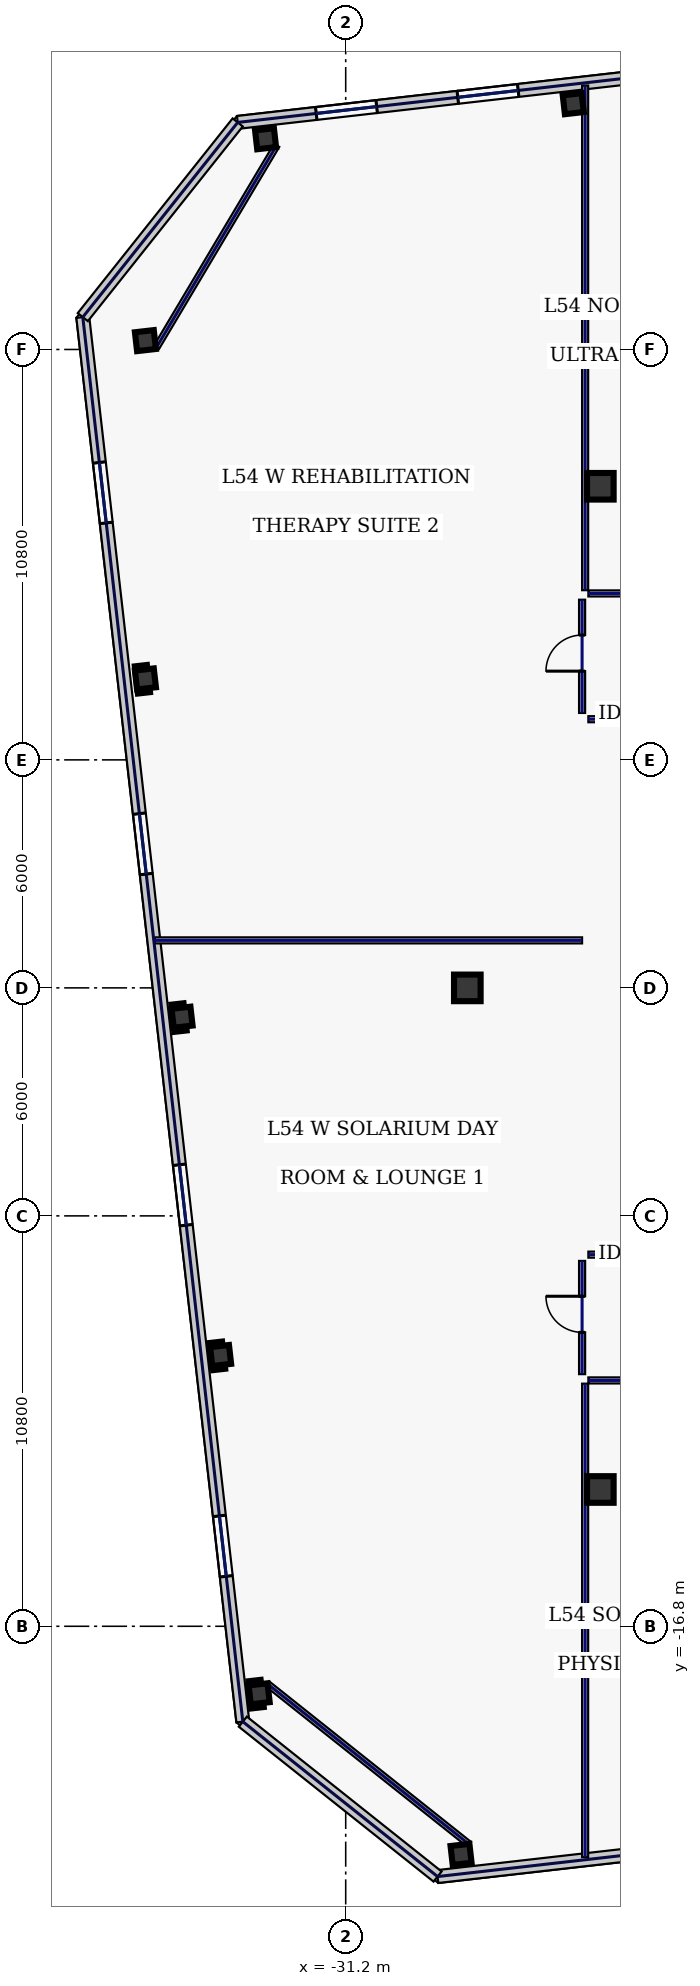
"""IFC4 building model, lengths in metres.
Left out: names, types, materials, properties, quantities, classifications, styles, units other than length and angle.
Written with IfcOpenShell. Run it as: python <this file> out.ifc"""

import sys

from ifc_helpers import new_model, si_unit, direction, frame, frame_2d, origin, origin_2d, place, context, subcontext, project, spatial, rectangle, hollow_rectangle, extrude, element, fill, save


model = new_model("IFC4")
c1 = context("Model", 3, precision=1e-05, world=origin(), true_north=direction((0.0, 1.0)))
c2 = subcontext(c1, "Body", "Model", "MODEL_VIEW")
j1 = project(units=[si_unit("LENGTHUNIT", "METRE"), si_unit("PLANEANGLEUNIT", "RADIAN")], contexts=[c1])
p1 = place(None, origin())
s1 = spatial("IfcSite", under=j1, at=p1, CompositionType="ELEMENT")
p2 = place(p1, origin())
s2 = spatial("IfcBuilding", under=s1, at=p2, CompositionType="ELEMENT")
p3 = place(p2, frame((0.0, 0.0, 234.2)))
s3 = spatial("IfcBuildingStorey", under=s2, at=p3, CompositionType="ELEMENT", Elevation=234.2)
for number, where, z_axis, x_axis in (
    (1, (-24.5, -13.2, 0.0), (0.0, 0.0, 1.0), (1.0, 0.0, 0.0)),
    (2, (-24.5, 13.2, 0.0), (0.0, 0.0, 1.0), (1.0, 0.0, 0.0)),
    (3, (-28.0, 0.0, 0.0), (0.0, 0.0, 1.0), (1.0, 0.0, 0.0)),
):
    element("IfcColumn", number, at=place(p3, frame(where, z_axis=z_axis, x_axis=x_axis)), inside=s3, PredefinedType="COLUMN", context=c2, shape_type="SweptSolid", body=[
        extrude(hollow_rectangle(XDim=0.7, YDim=0.7, WallThickness=0.032, at=origin_2d()), origin(), (0.0, 0.0, 1.0), 3.74),
    ])
for number, where, z_axis, x_axis in (
    (4, (-28.165, -22.802, 0.0), (0.0, 0.0, 1.0), (0.994, 0.113, 0.0)),
    (5, (-25.212, 23.268, 0.0), (0.0, 0.0, 1.0), (0.994, 0.113, 0.0)),
    (6, (-33.309, 22.345, 0.0), (0.0, 0.0, 1.0), (0.994, 0.113, 0.0)),
    (7, (-36.47, 17.033, 0.0), (0.0, 0.0, 1.0), (0.994, 0.113, 0.0)),
    (8, (-36.47, 8.131, 0.0), (0.0, 0.0, 1.0), (0.994, 0.113, 0.0)),
    (9, (-35.506, -0.772, 0.0), (0.0, 0.0, 1.0), (0.994, 0.113, 0.0)),
    (10, (-34.491, -9.674, 0.0), (0.0, 0.0, 1.0), (0.994, 0.113, 0.0)),
    (11, (-33.477, -18.577, 0.0), (0.0, 0.0, 1.0), (0.994, 0.113, 0.0)),
):
    element("IfcColumn", number, at=place(p3, frame(where, z_axis=z_axis, x_axis=x_axis)), inside=s3, PredefinedType="COLUMN", context=c2, shape_type="SweptSolid", body=[
        extrude(hollow_rectangle(XDim=0.5, YDim=0.5, WallThickness=0.025, at=origin_2d()), origin(), (0.0, 0.0, 1.0), 3.74),
    ])
p4 = place(p3, frame((-28.783, -23.386, 0.0), z_axis=(0.0, 0.0, 1.0), x_axis=(0.993572271362, 0.113199565282, 0.0)))
e12 = element("IfcWall", 12, at=p4, inside=s3, PredefinedType="STANDARD", context=c2, shape_type="SweptSolid", body=[
    extrude(rectangle(XDim=18.651, YDim=0.34, at=frame_2d((9.326, 0.0))), origin(), (0.0, 0.0, 1.0), 3.74),
])
p5 = place(p4, frame((5.829, 0.0, 0.22)))
e13 = element("IfcOpeningElement", 13, at=p5, cuts=e12, PredefinedType="OPENING", context=c2, shape_type="SweptSolid", body=[
    extrude(rectangle(XDim=1.6, YDim=1.2, at=frame_2d((0.8, 0.6))), frame((0.0, 0.18, 0.0), z_axis=(0.0, -1.0, 0.0), x_axis=(1.0, 0.0, 0.0)), (0.0, 0.0, 1.0), 0.36),
])
p6 = place(p4, frame((10.229, 0.0, 0.22)))
e14 = element("IfcOpeningElement", 14, at=p6, cuts=e12, PredefinedType="OPENING", context=c2, shape_type="SweptSolid", body=[
    extrude(rectangle(XDim=1.6, YDim=1.2, at=frame_2d((0.8, 0.6))), frame((0.0, 0.18, 0.0), z_axis=(0.0, -1.0, 0.0), x_axis=(1.0, 0.0, 0.0)), (0.0, 0.0, 1.0), 0.36),
])
p7 = place(p3, frame((-15.51, 24.886, 0.0), z_axis=(0.0, 0.0, 1.0), x_axis=(-0.993572271362, -0.113199565282, 0.0)))
e15 = element("IfcWall", 15, at=p7, inside=s3, PredefinedType="STANDARD", context=c2, shape_type="SweptSolid", body=[
    extrude(rectangle(XDim=18.651, YDim=0.34, at=frame_2d((9.326, 0.0))), origin(), (0.0, 0.0, 1.0), 3.74),
])
p8 = place(p7, frame((14.971, 0.0, 0.22)))
e16 = element("IfcOpeningElement", 16, at=p8, cuts=e15, PredefinedType="OPENING", context=c2, shape_type="SweptSolid", body=[
    extrude(rectangle(XDim=1.6, YDim=1.2, at=frame_2d((0.8, 0.6))), frame((0.0, 0.18, 0.0), z_axis=(0.0, -1.0, 0.0), x_axis=(1.0, 0.0, 0.0)), (0.0, 0.0, 1.0), 0.36),
])
p9 = place(p7, frame((11.223, 0.0, 0.22)))
e17 = element("IfcOpeningElement", 17, at=p9, cuts=e15, PredefinedType="OPENING", context=c2, shape_type="SweptSolid", body=[
    extrude(rectangle(XDim=1.6, YDim=1.2, at=frame_2d((0.8, 0.6))), frame((0.0, 0.18, 0.0), z_axis=(0.0, -1.0, 0.0), x_axis=(1.0, 0.0, 0.0)), (0.0, 0.0, 1.0), 0.36),
])
p10 = place(p7, frame((6.823, 0.0, 0.22)))
e18 = element("IfcOpeningElement", 18, at=p10, cuts=e15, PredefinedType="OPENING", context=c2, shape_type="SweptSolid", body=[
    extrude(rectangle(XDim=1.6, YDim=1.2, at=frame_2d((0.8, 0.6))), frame((0.0, 0.18, 0.0), z_axis=(0.0, -1.0, 0.0), x_axis=(1.0, 0.0, 0.0)), (0.0, 0.0, 1.0), 0.36),
])
p11 = place(p3, frame((-38.118, 17.651, 0.0), z_axis=(0.0, 0.0, 1.0), x_axis=(0.11320360501, -0.9935718111, 0.0)))
e19 = element("IfcWall", 19, at=p11, inside=s3, PredefinedType="STANDARD", context=c2, shape_type="SweptSolid", body=[
    extrude(rectangle(XDim=37.2, YDim=0.34, at=frame_2d((18.6, 0.0))), origin(), (0.0, 0.0, 1.0), 3.74),
])
p12 = place(p11, frame((3.85, 0.0, 0.22)))
e20 = element("IfcOpeningElement", 20, at=p12, cuts=e19, PredefinedType="OPENING", context=c2, shape_type="SweptSolid", body=[
    extrude(rectangle(XDim=1.6, YDim=1.2, at=frame_2d((0.8, 0.6))), frame((0.0, 0.18, 0.0), z_axis=(0.0, -1.0, 0.0), x_axis=(1.0, 0.0, 0.0)), (0.0, 0.0, 1.0), 0.36),
])
p13 = place(p11, frame((13.15, 0.0, 0.22)))
e21 = element("IfcOpeningElement", 21, at=p13, cuts=e19, PredefinedType="OPENING", context=c2, shape_type="SweptSolid", body=[
    extrude(rectangle(XDim=1.6, YDim=1.2, at=frame_2d((0.8, 0.6))), frame((0.0, 0.18, 0.0), z_axis=(0.0, -1.0, 0.0), x_axis=(1.0, 0.0, 0.0)), (0.0, 0.0, 1.0), 0.36),
])
p14 = place(p11, frame((22.45, 0.0, 0.22)))
e22 = element("IfcOpeningElement", 22, at=p14, cuts=e19, PredefinedType="OPENING", context=c2, shape_type="SweptSolid", body=[
    extrude(rectangle(XDim=1.6, YDim=1.2, at=frame_2d((0.8, 0.6))), frame((0.0, 0.18, 0.0), z_axis=(0.0, -1.0, 0.0), x_axis=(1.0, 0.0, 0.0)), (0.0, 0.0, 1.0), 0.36),
])
p15 = place(p11, frame((31.75, 0.0, 0.22)))
e23 = element("IfcOpeningElement", 23, at=p15, cuts=e19, PredefinedType="OPENING", context=c2, shape_type="SweptSolid", body=[
    extrude(rectangle(XDim=1.6, YDim=1.2, at=frame_2d((0.8, 0.6))), frame((0.0, 0.18, 0.0), z_axis=(0.0, -1.0, 0.0), x_axis=(1.0, 0.0, 0.0)), (0.0, 0.0, 1.0), 0.36),
])
for number, where, z_axis, x_axis in (
    (24, (-34.042, 22.775, 0.0), (0.0, 0.0, 1.0), (-0.623, -0.783, 0.0)),
    (25, (-33.907, -19.31, 0.0), (0.0, 0.0, 1.0), (0.783, -0.623, 0.0)),
):
    element("IfcWall", number, at=place(p3, frame(where, z_axis=z_axis, x_axis=x_axis)), inside=s3, PredefinedType="STANDARD", context=c2, shape_type="SweptSolid", body=[
        extrude(rectangle(XDim=6.548, YDim=0.34, at=frame_2d((3.274, 0.0))), origin(), (0.0, 0.0, 1.0), 3.74),
    ])
p16 = place(p3, frame((-33.016, 22.171, 0.0), z_axis=(0.0, 0.0, 1.0), x_axis=(-0.511385266265, -0.859351563359, 0.0)))
e26 = element("IfcWall", 26, at=p16, inside=s3, PredefinedType="PARTITIONING", context=c2, shape_type="SweptSolid", body=[
    extrude(rectangle(XDim=6.182, YDim=0.16, at=frame_2d((3.091, 0.0))), origin(), (0.0, 0.0, 1.0), 1.535),
])
p17 = place(p3, frame((-33.265, -18.311, 0.0), z_axis=(0.0, 0.0, 1.0), x_axis=(0.782602647064, -0.622521563328, 0.0)))
e27 = element("IfcWall", 27, at=p17, inside=s3, PredefinedType="PARTITIONING", context=c2, shape_type="SweptSolid", body=[
    extrude(rectangle(XDim=6.788, YDim=0.16, at=frame_2d((3.394, 0.0))), origin(), (0.0, 0.0, 1.0), 1.535),
])
p18 = place(p3, frame((-24.98, -10.165, 0.0), z_axis=(0.0, 0.0, 1.0), x_axis=(0.0, 1.0, 0.0)))
e28 = element("IfcWall", 28, at=p18, inside=s3, PredefinedType="PARTITIONING", context=c2, shape_type="SweptSolid", body=[
    extrude(rectangle(XDim=2.98, YDim=0.16, at=frame_2d((1.49, 0.0))), origin(), (0.0, 0.0, 1.0), 3.74),
])
p19 = place(p18, frame((1.1, 0.0, 0.0)))
e29 = element("IfcOpeningElement", 29, at=p19, cuts=e28, PredefinedType="OPENING", context=c2, shape_type="SweptSolid", body=[
    extrude(rectangle(XDim=0.95, YDim=2.2, at=frame_2d((0.475, 1.1))), frame((0.0, 0.09, 0.0), z_axis=(0.0, -1.0, 0.0), x_axis=(1.0, 0.0, 0.0)), (0.0, 0.0, 1.0), 0.18),
])
for number, where, z_axis, x_axis in (
    (30, (-24.815, -7.02, 0.0), (0.0, 0.0, 1.0), (1.0, 0.0, 0.0)),
    (31, (-10.715, 7.07, 0.0), (0.0, 0.0, 1.0), (-1.0, 0.0, 0.0)),
):
    element("IfcWall", number, at=place(p3, frame(where, z_axis=z_axis, x_axis=x_axis)), inside=s3, PredefinedType="PARTITIONING", context=c2, shape_type="SweptSolid", body=[
        extrude(rectangle(XDim=14.1, YDim=0.16, at=frame_2d((7.05, 0.0))), origin(), (0.0, 0.0, 1.0), 3.74),
    ])
p20 = place(p3, frame((-24.98, 7.235, 0.0), z_axis=(0.0, 0.0, 1.0), x_axis=(0.0, 1.0, 0.0)))
e32 = element("IfcWall", 32, at=p20, inside=s3, PredefinedType="PARTITIONING", context=c2, shape_type="SweptSolid", body=[
    extrude(rectangle(XDim=2.98, YDim=0.16, at=frame_2d((1.49, 0.0))), origin(), (0.0, 0.0, 1.0), 3.74),
])
p21 = place(p20, frame((1.1, 0.0, 0.0)))
e33 = element("IfcOpeningElement", 33, at=p21, cuts=e32, PredefinedType="OPENING", context=c2, shape_type="SweptSolid", body=[
    extrude(rectangle(XDim=0.95, YDim=2.2, at=frame_2d((0.475, 1.1))), frame((0.0, 0.09, 0.0), z_axis=(0.0, -1.0, 0.0), x_axis=(1.0, 0.0, 0.0)), (0.0, 0.0, 1.0), 0.18),
])
p22 = place(p3, frame((-24.815, 10.38, 0.0), z_axis=(0.0, 0.0, 1.0), x_axis=(1.0, 0.0, 0.0)))
e34 = element("IfcWall", 34, at=p22, inside=s3, PredefinedType="PARTITIONING", context=c2, shape_type="SweptSolid", body=[
    extrude(rectangle(XDim=49.63, YDim=0.16, at=frame_2d((24.815, 0.0))), origin(), (0.0, 0.0, 1.0), 3.74),
])
p23 = place(p22, frame((2.044, 0.0, 0.0)))
e35 = element("IfcOpeningElement", 35, at=p23, cuts=e34, PredefinedType="OPENING", context=c2, shape_type="SweptSolid", body=[
    extrude(rectangle(XDim=0.95, YDim=2.2, at=frame_2d((0.475, 1.1))), frame((0.0, 0.09, 0.0), z_axis=(0.0, -1.0, 0.0), x_axis=(1.0, 0.0, 0.0)), (0.0, 0.0, 1.0), 0.18),
])
p24 = place(p22, frame((7.22, 0.0, 0.0)))
e36 = element("IfcOpeningElement", 36, at=p24, cuts=e34, PredefinedType="OPENING", context=c2, shape_type="SweptSolid", body=[
    extrude(rectangle(XDim=1.05, YDim=2.2, at=frame_2d((0.525, 1.1))), frame((0.0, 0.09, 0.0), z_axis=(0.0, -1.0, 0.0), x_axis=(1.0, 0.0, 0.0)), (0.0, 0.0, 1.0), 0.18),
])
p25 = place(p22, frame((13.77, 0.0, 0.0)))
e37 = element("IfcOpeningElement", 37, at=p25, cuts=e34, PredefinedType="OPENING", context=c2, shape_type="SweptSolid", body=[
    extrude(rectangle(XDim=1.3, YDim=2.2, at=frame_2d((0.65, 1.1))), frame((0.0, 0.09, 0.0), z_axis=(0.0, -1.0, 0.0), x_axis=(1.0, 0.0, 0.0)), (0.0, 0.0, 1.0), 0.18),
])
p26 = place(p22, frame((21.925, 0.0, 0.0)))
e38 = element("IfcOpeningElement", 38, at=p26, cuts=e34, PredefinedType="OPENING", context=c2, shape_type="SweptSolid", body=[
    extrude(rectangle(XDim=0.95, YDim=2.2, at=frame_2d((0.475, 1.1))), frame((0.0, 0.09, 0.0), z_axis=(0.0, -1.0, 0.0), x_axis=(1.0, 0.0, 0.0)), (0.0, 0.0, 1.0), 0.18),
])
p27 = place(p22, frame((30.525, 0.0, 0.0)))
e39 = element("IfcOpeningElement", 39, at=p27, cuts=e34, PredefinedType="OPENING", context=c2, shape_type="SweptSolid", body=[
    extrude(rectangle(XDim=0.95, YDim=2.2, at=frame_2d((0.475, 1.1))), frame((0.0, 0.09, 0.0), z_axis=(0.0, -1.0, 0.0), x_axis=(1.0, 0.0, 0.0)), (0.0, 0.0, 1.0), 0.18),
])
p28 = place(p22, frame((38.85, 0.0, 0.0)))
e40 = element("IfcOpeningElement", 40, at=p28, cuts=e34, PredefinedType="OPENING", context=c2, shape_type="SweptSolid", body=[
    extrude(rectangle(XDim=1.3, YDim=2.2, at=frame_2d((0.65, 1.1))), frame((0.0, 0.09, 0.0), z_axis=(0.0, -1.0, 0.0), x_axis=(1.0, 0.0, 0.0)), (0.0, 0.0, 1.0), 0.18),
])
p29 = place(p22, frame((45.906, 0.0, 0.0)))
e41 = element("IfcOpeningElement", 41, at=p29, cuts=e34, PredefinedType="OPENING", context=c2, shape_type="SweptSolid", body=[
    extrude(rectangle(XDim=1.3, YDim=2.2, at=frame_2d((0.65, 1.1))), frame((0.0, 0.09, 0.0), z_axis=(0.0, -1.0, 0.0), x_axis=(1.0, 0.0, 0.0)), (0.0, 0.0, 1.0), 0.18),
])
p30 = place(p3, frame((24.815, -10.33, 0.0), z_axis=(0.0, 0.0, 1.0), x_axis=(-1.0, 0.0, 0.0)))
e42 = element("IfcWall", 42, at=p30, inside=s3, PredefinedType="PARTITIONING", context=c2, shape_type="SweptSolid", body=[
    extrude(rectangle(XDim=49.63, YDim=0.16, at=frame_2d((24.815, 0.0))), origin(), (0.0, 0.0, 1.0), 3.74),
])
p31 = place(p30, frame((46.806, 0.0, 0.0)))
e43 = element("IfcOpeningElement", 43, at=p31, cuts=e42, PredefinedType="OPENING", context=c2, shape_type="SweptSolid", body=[
    extrude(rectangle(XDim=0.95, YDim=2.2, at=frame_2d((0.475, 1.1))), frame((0.0, 0.09, 0.0), z_axis=(0.0, -1.0, 0.0), x_axis=(1.0, 0.0, 0.0)), (0.0, 0.0, 1.0), 0.18),
])
p32 = place(p30, frame((41.955, 0.0, 0.0)))
e44 = element("IfcOpeningElement", 44, at=p32, cuts=e42, PredefinedType="OPENING", context=c2, shape_type="SweptSolid", body=[
    extrude(rectangle(XDim=1.3, YDim=2.2, at=frame_2d((0.65, 1.1))), frame((0.0, 0.09, 0.0), z_axis=(0.0, -1.0, 0.0), x_axis=(1.0, 0.0, 0.0)), (0.0, 0.0, 1.0), 0.18),
])
p33 = place(p30, frame((33.705, 0.0, 0.0)))
e45 = element("IfcOpeningElement", 45, at=p33, cuts=e42, PredefinedType="OPENING", context=c2, shape_type="SweptSolid", body=[
    extrude(rectangle(XDim=0.95, YDim=2.2, at=frame_2d((0.475, 1.1))), frame((0.0, 0.09, 0.0), z_axis=(0.0, -1.0, 0.0), x_axis=(1.0, 0.0, 0.0)), (0.0, 0.0, 1.0), 0.18),
])
p34 = place(p30, frame((24.125, 0.0, 0.0)))
e46 = element("IfcOpeningElement", 46, at=p34, cuts=e42, PredefinedType="OPENING", context=c2, shape_type="SweptSolid", body=[
    extrude(rectangle(XDim=0.95, YDim=2.2, at=frame_2d((0.475, 1.1))), frame((0.0, 0.09, 0.0), z_axis=(0.0, -1.0, 0.0), x_axis=(1.0, 0.0, 0.0)), (0.0, 0.0, 1.0), 0.18),
])
p35 = place(p30, frame((13.825, 0.0, 0.0)))
e47 = element("IfcOpeningElement", 47, at=p35, cuts=e42, PredefinedType="OPENING", context=c2, shape_type="SweptSolid", body=[
    extrude(rectangle(XDim=1.05, YDim=2.2, at=frame_2d((0.525, 1.1))), frame((0.0, 0.09, 0.0), z_axis=(0.0, -1.0, 0.0), x_axis=(1.0, 0.0, 0.0)), (0.0, 0.0, 1.0), 0.18),
])
p36 = place(p30, frame((3.569, 0.0, 0.0)))
e48 = element("IfcOpeningElement", 48, at=p36, cuts=e42, PredefinedType="OPENING", context=c2, shape_type="SweptSolid", body=[
    extrude(rectangle(XDim=0.95, YDim=2.2, at=frame_2d((0.475, 1.1))), frame((0.0, 0.09, 0.0), z_axis=(0.0, -1.0, 0.0), x_axis=(1.0, 0.0, 0.0)), (0.0, 0.0, 1.0), 0.18),
])
p37 = place(p3, frame((-24.9, 10.465, 0.0), z_axis=(0.0, 0.0, 1.0), x_axis=(0.0, 1.0, 0.0)))
e49 = element("IfcWall", 49, at=p37, inside=s3, PredefinedType="PARTITIONING", context=c2, shape_type="SweptSolid", body=[
    extrude(rectangle(XDim=13.281, YDim=0.16, at=frame_2d((6.641, 0.0))), origin(), (0.0, 0.0, 1.0), 3.285),
])
p38 = place(p3, frame((-24.9, -22.873, 0.0), z_axis=(0.0, 0.0, 1.0), x_axis=(0.0, 1.0, 0.0)))
e50 = element("IfcWall", 50, at=p38, inside=s3, PredefinedType="PARTITIONING", context=c2, shape_type="SweptSolid", body=[
    extrude(rectangle(XDim=12.458, YDim=0.16, at=frame_2d((6.229, 0.0))), origin(), (0.0, 0.0, 1.0), 3.74),
])
p39 = place(p3, frame((-36.229, 1.25, 0.0), z_axis=(0.0, 0.0, 1.0), x_axis=(1.0, 0.0, 0.0)))
e51 = element("IfcWall", 51, at=p39, inside=s3, PredefinedType="PARTITIONING", context=c2, shape_type="SweptSolid", body=[
    extrude(rectangle(XDim=11.25, YDim=0.16, at=frame_2d((5.625, 0.0))), origin(), (0.0, 0.0, 1.0), 3.74),
])
p40 = place(p8, origin())
e52 = element("IfcWindow", 52, at=p40, inside=s3, PartitioningType="SINGLE_PANEL", PredefinedType="WINDOW", context=c2, shape_type="SweptSolid", body=[
    extrude(rectangle(XDim=1.6, YDim=1.2, at=frame_2d((0.8, 0.6))), frame((0.0, 0.03, 0.0), z_axis=(0.0, -1.0, 0.0), x_axis=(1.0, 0.0, 0.0)), (0.0, 0.0, 1.0), 0.06),
])
fill(e16, e52)
p41 = place(p9, origin())
e53 = element("IfcWindow", 53, at=p41, inside=s3, PartitioningType="SINGLE_PANEL", PredefinedType="WINDOW", context=c2, shape_type="SweptSolid", body=[
    extrude(rectangle(XDim=1.6, YDim=1.2, at=frame_2d((0.8, 0.6))), frame((0.0, 0.03, 0.0), z_axis=(0.0, -1.0, 0.0), x_axis=(1.0, 0.0, 0.0)), (0.0, 0.0, 1.0), 0.06),
])
fill(e17, e53)
p42 = place(p12, origin())
e54 = element("IfcWindow", 54, at=p42, inside=s3, PartitioningType="SINGLE_PANEL", PredefinedType="WINDOW", context=c2, shape_type="SweptSolid", body=[
    extrude(rectangle(XDim=1.6, YDim=1.2, at=frame_2d((0.8, 0.6))), frame((0.0, 0.03, 0.0), z_axis=(0.0, -1.0, 0.0), x_axis=(1.0, 0.0, 0.0)), (0.0, 0.0, 1.0), 0.06),
])
fill(e20, e54)
p43 = place(p13, origin())
e55 = element("IfcWindow", 55, at=p43, inside=s3, PartitioningType="SINGLE_PANEL", PredefinedType="WINDOW", context=c2, shape_type="SweptSolid", body=[
    extrude(rectangle(XDim=1.6, YDim=1.2, at=frame_2d((0.8, 0.6))), frame((0.0, 0.03, 0.0), z_axis=(0.0, -1.0, 0.0), x_axis=(1.0, 0.0, 0.0)), (0.0, 0.0, 1.0), 0.06),
])
fill(e21, e55)
p44 = place(p14, origin())
e56 = element("IfcWindow", 56, at=p44, inside=s3, PartitioningType="SINGLE_PANEL", PredefinedType="WINDOW", context=c2, shape_type="SweptSolid", body=[
    extrude(rectangle(XDim=1.6, YDim=1.2, at=frame_2d((0.8, 0.6))), frame((0.0, 0.03, 0.0), z_axis=(0.0, -1.0, 0.0), x_axis=(1.0, 0.0, 0.0)), (0.0, 0.0, 1.0), 0.06),
])
fill(e22, e56)
p45 = place(p15, origin())
e57 = element("IfcWindow", 57, at=p45, inside=s3, PartitioningType="SINGLE_PANEL", PredefinedType="WINDOW", context=c2, shape_type="SweptSolid", body=[
    extrude(rectangle(XDim=1.6, YDim=1.2, at=frame_2d((0.8, 0.6))), frame((0.0, 0.03, 0.0), z_axis=(0.0, -1.0, 0.0), x_axis=(1.0, 0.0, 0.0)), (0.0, 0.0, 1.0), 0.06),
])
fill(e23, e57)
p46 = place(p19, origin())
e58 = element("IfcDoor", 58, at=p46, inside=s3, OperationType="SINGLE_SWING_RIGHT", PredefinedType="DOOR", context=c2, shape_type="SweptSolid", body=[
    extrude(rectangle(XDim=0.95, YDim=2.2, at=frame_2d((0.475, 1.1))), frame((0.0, 0.025, 0.0), z_axis=(0.0, -1.0, 0.0), x_axis=(1.0, 0.0, 0.0)), (0.0, 0.0, 1.0), 0.05),
])
fill(e29, e58)
p47 = place(p21, origin())
e59 = element("IfcDoor", 59, at=p47, inside=s3, OperationType="SINGLE_SWING_LEFT", PredefinedType="DOOR", context=c2, shape_type="SweptSolid", body=[
    extrude(rectangle(XDim=0.95, YDim=2.2, at=frame_2d((0.475, 1.1))), frame((0.0, 0.025, 0.0), z_axis=(0.0, -1.0, 0.0), x_axis=(1.0, 0.0, 0.0)), (0.0, 0.0, 1.0), 0.05),
])
fill(e33, e59)
save(model, sys.argv[1])
